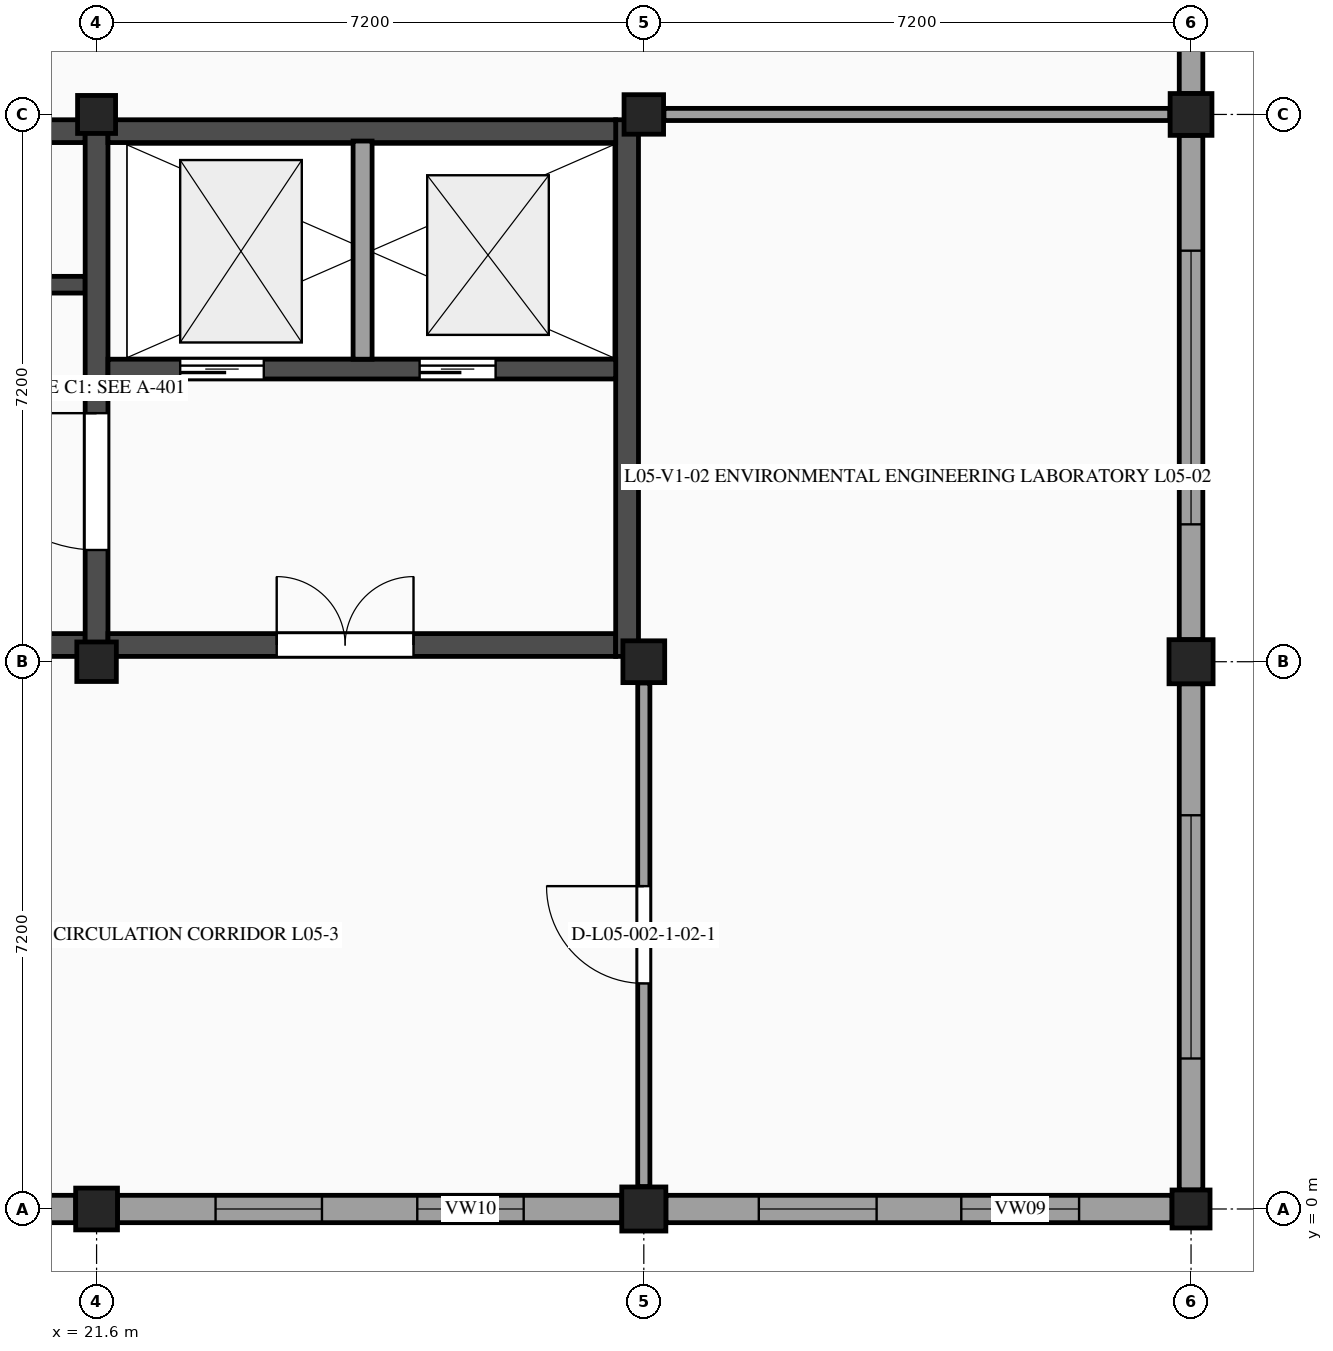
"""IFC4 building model, lengths in metres.
Left out: names, types, materials, properties, quantities, classifications, styles, units other than length and angle.
Written with IfcOpenShell. Run it as: python <this file> out.ifc"""

import sys

from ifc_helpers import new_model, si_unit, direction, frame, frame_2d, origin, origin_2d, place, context, subcontext, project, spatial, rectangle, extrude, element, fill, save


model = new_model("IFC4")
c1 = context("Model", 3, precision=1e-05, world=origin(), true_north=direction((0.0, 1.0)))
c2 = subcontext(c1, "Body", "Model", "MODEL_VIEW")
j1 = project(units=[si_unit("LENGTHUNIT", "METRE"), si_unit("PLANEANGLEUNIT", "RADIAN")], contexts=[c1])
p1 = place(None, origin())
s1 = spatial("IfcSite", under=j1, at=p1, CompositionType="ELEMENT")
p2 = place(p1, origin())
s2 = spatial("IfcBuilding", under=s1, at=p2, CompositionType="ELEMENT")
p3 = place(p2, frame((0.0, 0.0, 22.8)))
s3 = spatial("IfcBuildingStorey", under=s2, at=p3, CompositionType="ELEMENT", Elevation=22.8)
p4 = place(p3, frame((21.6, 0.0, 0.0), z_axis=(0.0, 0.0, 1.0), x_axis=(1.0, 0.0, 0.0)))
e1 = element("IfcColumn", 1, at=p4, inside=s3, PredefinedType="COLUMN", context=c2, shape_type="SweptSolid", body=[
    extrude(rectangle(XDim=0.55, YDim=0.55, at=origin_2d()), origin(), (0.0, 0.0, 1.0), 3.9),
])
p5 = place(p3, frame((21.6, 7.2, 0.0), z_axis=(0.0, 0.0, 1.0), x_axis=(1.0, 0.0, 0.0)))
e2 = element("IfcColumn", 2, at=p5, inside=s3, PredefinedType="COLUMN", context=c2, shape_type="SweptSolid", body=[
    extrude(rectangle(XDim=0.52, YDim=0.52, at=origin_2d()), origin(), (0.0, 0.0, 1.0), 3.9),
])
p6 = place(p3, frame((21.6, 14.4, 0.0), z_axis=(0.0, 0.0, 1.0), x_axis=(1.0, 0.0, 0.0)))
e3 = element("IfcColumn", 3, at=p6, inside=s3, PredefinedType="COLUMN", context=c2, shape_type="SweptSolid", body=[
    extrude(rectangle(XDim=0.5, YDim=0.5, at=origin_2d()), origin(), (0.0, 0.0, 1.0), 3.9),
])
p7 = place(p3, frame((28.8, 0.0, 0.0), z_axis=(0.0, 0.0, 1.0), x_axis=(1.0, 0.0, 0.0)))
e4 = element("IfcColumn", 4, at=p7, inside=s3, PredefinedType="COLUMN", context=c2, shape_type="SweptSolid", body=[
    extrude(rectangle(XDim=0.58, YDim=0.58, at=origin_2d()), origin(), (0.0, 0.0, 1.0), 3.9),
])
p8 = place(p3, frame((28.8, 7.2, 0.0), z_axis=(0.0, 0.0, 1.0), x_axis=(1.0, 0.0, 0.0)))
e5 = element("IfcColumn", 5, at=p8, inside=s3, PredefinedType="COLUMN", context=c2, shape_type="SweptSolid", body=[
    extrude(rectangle(XDim=0.55, YDim=0.55, at=origin_2d()), origin(), (0.0, 0.0, 1.0), 3.9),
])
p9 = place(p3, frame((28.8, 14.4, 0.0), z_axis=(0.0, 0.0, 1.0), x_axis=(1.0, 0.0, 0.0)))
e6 = element("IfcColumn", 6, at=p9, inside=s3, PredefinedType="COLUMN", context=c2, shape_type="SweptSolid", body=[
    extrude(rectangle(XDim=0.52, YDim=0.52, at=origin_2d()), origin(), (0.0, 0.0, 1.0), 3.9),
])
p10 = place(p3, frame((36.0, 0.0, 0.0), z_axis=(0.0, 0.0, 1.0), x_axis=(1.0, 0.0, 0.0)))
e7 = element("IfcColumn", 7, at=p10, inside=s3, PredefinedType="COLUMN", context=c2, shape_type="SweptSolid", body=[
    extrude(rectangle(XDim=0.5, YDim=0.5, at=origin_2d()), origin(), (0.0, 0.0, 1.0), 3.9),
])
p11 = place(p3, frame((36.0, 7.2, 0.0), z_axis=(0.0, 0.0, 1.0), x_axis=(1.0, 0.0, 0.0)))
e8 = element("IfcColumn", 8, at=p11, inside=s3, PredefinedType="COLUMN", context=c2, shape_type="SweptSolid", body=[
    extrude(rectangle(XDim=0.58, YDim=0.58, at=origin_2d()), origin(), (0.0, 0.0, 1.0), 3.9),
])
p12 = place(p3, frame((36.0, 14.4, 0.0), z_axis=(0.0, 0.0, 1.0), x_axis=(1.0, 0.0, 0.0)))
e9 = element("IfcColumn", 9, at=p12, inside=s3, PredefinedType="COLUMN", context=c2, shape_type="SweptSolid", body=[
    extrude(rectangle(XDim=0.55, YDim=0.55, at=origin_2d()), origin(), (0.0, 0.0, 1.0), 3.9),
])
p13 = place(p3, frame((36.0, 21.34, 0.0), z_axis=(0.0, 0.0, 1.0), x_axis=(0.0, -1.0, 0.0)))
e10 = element("IfcWall", 10, at=p13, inside=s3, PredefinedType="STANDARD", context=c2, shape_type="SweptSolid", body=[
    extrude(rectangle(XDim=6.665, YDim=0.31, at=frame_2d((3.333, 0.0))), origin(), (0.0, 0.0, 1.0), 2.865),
])
p14 = place(p13, frame((1.232, 0.0, 0.98)))
e11 = element("IfcOpeningElement", 11, at=p14, cuts=e10, PredefinedType="OPENING", context=c2, shape_type="SweptSolid", body=[
    extrude(rectangle(XDim=4.2, YDim=1.5, at=frame_2d((2.1, 0.75))), frame((0.0, 0.165, 0.0), z_axis=(0.0, -1.0, 0.0), x_axis=(1.0, 0.0, 0.0)), (0.0, 0.0, 1.0), 0.33),
])
p15 = place(p3, frame((36.0, 14.125, 0.0), z_axis=(0.0, 0.0, 1.0), x_axis=(0.0, -1.0, 0.0)))
e12 = element("IfcWall", 12, at=p15, inside=s3, PredefinedType="STANDARD", context=c2, shape_type="SweptSolid", body=[
    extrude(rectangle(XDim=6.635, YDim=0.31, at=frame_2d((3.317, 0.0))), origin(), (0.0, 0.0, 1.0), 2.865),
])
p16 = place(p15, frame((1.518, 0.0, 0.98)))
e13 = element("IfcOpeningElement", 13, at=p16, cuts=e12, PredefinedType="OPENING", context=c2, shape_type="SweptSolid", body=[
    extrude(rectangle(XDim=3.6, YDim=1.5, at=frame_2d((1.8, 0.75))), frame((0.0, 0.165, 0.0), z_axis=(0.0, -1.0, 0.0), x_axis=(1.0, 0.0, 0.0)), (0.0, 0.0, 1.0), 0.33),
])
p17 = place(p3, frame((36.0, 6.91, 0.0), z_axis=(0.0, 0.0, 1.0), x_axis=(0.0, -1.0, 0.0)))
e14 = element("IfcWall", 14, at=p17, inside=s3, PredefinedType="STANDARD", context=c2, shape_type="SweptSolid", body=[
    extrude(rectangle(XDim=6.66, YDim=0.31, at=frame_2d((3.33, 0.0))), origin(), (0.0, 0.0, 1.0), 2.865),
])
p18 = place(p17, frame((1.73, 0.0, 0.98)))
e15 = element("IfcOpeningElement", 15, at=p18, cuts=e14, PredefinedType="OPENING", context=c2, shape_type="SweptSolid", body=[
    extrude(rectangle(XDim=3.2, YDim=1.45, at=frame_2d((1.6, 0.725))), frame((0.0, 0.165, 0.0), z_axis=(0.0, -1.0, 0.0), x_axis=(1.0, 0.0, 0.0)), (0.0, 0.0, 1.0), 0.33),
])
p19 = place(p3, frame((35.75, 0.0, 0.0), z_axis=(0.0, 0.0, 1.0), x_axis=(-1.0, 0.0, 0.0)))
e16 = element("IfcWall", 16, at=p19, inside=s3, PredefinedType="STANDARD", context=c2, shape_type="SweptSolid", body=[
    extrude(rectangle(XDim=6.66, YDim=0.36, at=frame_2d((3.33, 0.0))), origin(), (0.0, 0.0, 1.0), 2.865),
])
p20 = place(p19, frame((1.223, 0.0, 1.15)))
e17 = element("IfcOpeningElement", 17, at=p20, cuts=e16, PredefinedType="OPENING", context=c2, shape_type="SweptSolid", body=[
    extrude(rectangle(XDim=1.55, YDim=1.35, at=frame_2d((0.775, 0.675))), frame((0.0, 0.19, 0.0), z_axis=(0.0, -1.0, 0.0), x_axis=(1.0, 0.0, 0.0)), (0.0, 0.0, 1.0), 0.38),
])
p21 = place(p19, frame((3.887, 0.0, 1.15)))
e18 = element("IfcOpeningElement", 18, at=p21, cuts=e16, PredefinedType="OPENING", context=c2, shape_type="SweptSolid", body=[
    extrude(rectangle(XDim=1.55, YDim=1.35, at=frame_2d((0.775, 0.675))), frame((0.0, 0.19, 0.0), z_axis=(0.0, -1.0, 0.0), x_axis=(1.0, 0.0, 0.0)), (0.0, 0.0, 1.0), 0.38),
])
p22 = place(p3, frame((28.51, 0.0, 0.0), z_axis=(0.0, 0.0, 1.0), x_axis=(-1.0, 0.0, 0.0)))
e19 = element("IfcWall", 19, at=p22, inside=s3, PredefinedType="STANDARD", context=c2, shape_type="SweptSolid", body=[
    extrude(rectangle(XDim=6.635, YDim=0.36, at=frame_2d((3.317, 0.0))), origin(), (0.0, 0.0, 1.0), 2.865),
])
p23 = place(p22, frame((1.291, 0.0, 1.15)))
e20 = element("IfcOpeningElement", 20, at=p23, cuts=e19, PredefinedType="OPENING", context=c2, shape_type="SweptSolid", body=[
    extrude(rectangle(XDim=1.4, YDim=1.3, at=frame_2d((0.7, 0.65))), frame((0.0, 0.19, 0.0), z_axis=(0.0, -1.0, 0.0), x_axis=(1.0, 0.0, 0.0)), (0.0, 0.0, 1.0), 0.38),
])
p24 = place(p22, frame((3.945, 0.0, 1.15)))
e21 = element("IfcOpeningElement", 21, at=p24, cuts=e19, PredefinedType="OPENING", context=c2, shape_type="SweptSolid", body=[
    extrude(rectangle(XDim=1.4, YDim=1.3, at=frame_2d((0.7, 0.65))), frame((0.0, 0.19, 0.0), z_axis=(0.0, -1.0, 0.0), x_axis=(1.0, 0.0, 0.0)), (0.0, 0.0, 1.0), 0.38),
])
p25 = place(p3, frame((21.325, 0.0, 0.0), z_axis=(0.0, 0.0, 1.0), x_axis=(-1.0, 0.0, 0.0)))
e22 = element("IfcWall", 22, at=p25, inside=s3, PredefinedType="STANDARD", context=c2, shape_type="SweptSolid", body=[
    extrude(rectangle(XDim=6.665, YDim=0.36, at=frame_2d((3.333, 0.0))), origin(), (0.0, 0.0, 1.0), 2.865),
])
p26 = place(p25, frame((1.375, 0.0, 1.15)))
e23 = element("IfcOpeningElement", 23, at=p26, cuts=e22, PredefinedType="OPENING", context=c2, shape_type="SweptSolid", body=[
    extrude(rectangle(XDim=1.25, YDim=1.25, at=frame_2d((0.625, 0.625))), frame((0.0, 0.19, 0.0), z_axis=(0.0, -1.0, 0.0), x_axis=(1.0, 0.0, 0.0)), (0.0, 0.0, 1.0), 0.38),
])
p27 = place(p25, frame((4.041, 0.0, 1.15)))
e24 = element("IfcOpeningElement", 24, at=p27, cuts=e22, PredefinedType="OPENING", context=c2, shape_type="SweptSolid", body=[
    extrude(rectangle(XDim=1.25, YDim=1.25, at=frame_2d((0.625, 0.625))), frame((0.0, 0.19, 0.0), z_axis=(0.0, -1.0, 0.0), x_axis=(1.0, 0.0, 0.0)), (0.0, 0.0, 1.0), 0.38),
])
p28 = place(p3, frame((14.77, 7.42, 0.0), z_axis=(0.0, 0.0, 1.0), x_axis=(1.0, 0.0, 0.0)))
e25 = element("IfcWall", 25, at=p28, inside=s3, PredefinedType="SHEAR", context=c2, shape_type="SweptSolid", body=[
    extrude(rectangle(XDim=6.68, YDim=0.3, at=frame_2d((3.34, 0.0))), origin(), (0.0, 0.0, 1.0), 3.67),
])
p29 = place(p3, frame((14.77, 14.18, 0.0), z_axis=(0.0, 0.0, 1.0), x_axis=(1.0, 0.0, 0.0)))
e26 = element("IfcWall", 26, at=p29, inside=s3, PredefinedType="SHEAR", context=c2, shape_type="SweptSolid", body=[
    extrude(rectangle(XDim=6.68, YDim=0.3, at=frame_2d((3.34, 0.0))), origin(), (0.0, 0.0, 1.0), 3.67),
])
p30 = place(p29, frame((1.42, 0.0, 0.0)))
e27 = element("IfcOpeningElement", 27, at=p30, cuts=e26, PredefinedType="OPENING", context=c2, shape_type="SweptSolid", body=[
    extrude(rectangle(XDim=0.85, YDim=2.1, at=frame_2d((0.425, 1.05))), frame((0.0, 0.16, 0.0), z_axis=(0.0, -1.0, 0.0), x_axis=(1.0, 0.0, 0.0)), (0.0, 0.0, 1.0), 0.32),
])
p31 = place(p29, frame((3.4, 0.0, 0.0)))
e28 = element("IfcOpeningElement", 28, at=p31, cuts=e26, PredefinedType="OPENING", context=c2, shape_type="SweptSolid", body=[
    extrude(rectangle(XDim=0.95, YDim=2.15, at=frame_2d((0.475, 1.075))), frame((0.0, 0.16, 0.0), z_axis=(0.0, -1.0, 0.0), x_axis=(1.0, 0.0, 0.0)), (0.0, 0.0, 1.0), 0.32),
])
p32 = place(p3, frame((14.77, 12.16, 0.0), z_axis=(0.0, 0.0, 1.0), x_axis=(1.0, 0.0, 0.0)))
e29 = element("IfcWall", 29, at=p32, inside=s3, PredefinedType="SHEAR", context=c2, shape_type="SweptSolid", body=[
    extrude(rectangle(XDim=6.68, YDim=0.22, at=frame_2d((3.34, 0.0))), origin(), (0.0, 0.0, 1.0), 3.67),
])
p33 = place(p3, frame((21.6, 7.27, 0.0), z_axis=(0.0, 0.0, 1.0), x_axis=(0.0, 1.0, 0.0)))
e30 = element("IfcWall", 30, at=p33, inside=s3, PredefinedType="SHEAR", context=c2, shape_type="SweptSolid", body=[
    extrude(rectangle(XDim=7.06, YDim=0.3, at=frame_2d((3.53, 0.0))), origin(), (0.0, 0.0, 1.0), 3.67),
])
p34 = place(p33, frame((1.4, 0.0, 0.0)))
e31 = element("IfcOpeningElement", 31, at=p34, cuts=e30, PredefinedType="OPENING", context=c2, shape_type="SweptSolid", body=[
    extrude(rectangle(XDim=1.8, YDim=2.2, at=frame_2d((0.9, 1.1))), frame((0.0, 0.16, 0.0), z_axis=(0.0, -1.0, 0.0), x_axis=(1.0, 0.0, 0.0)), (0.0, 0.0, 1.0), 0.32),
])
p35 = place(p3, frame((21.75, 7.42, 0.0), z_axis=(0.0, 0.0, 1.0), x_axis=(1.0, 0.0, 0.0)))
e32 = element("IfcWall", 32, at=p35, inside=s3, PredefinedType="SHEAR", context=c2, shape_type="SweptSolid", body=[
    extrude(rectangle(XDim=6.68, YDim=0.3, at=frame_2d((3.34, 0.0))), origin(), (0.0, 0.0, 1.0), 3.67),
])
p36 = place(p35, frame((2.22, 0.0, 0.0)))
e33 = element("IfcOpeningElement", 33, at=p36, cuts=e32, PredefinedType="OPENING", context=c2, shape_type="SweptSolid", body=[
    extrude(rectangle(XDim=1.8, YDim=2.2, at=frame_2d((0.9, 1.1))), frame((0.0, 0.16, 0.0), z_axis=(0.0, -1.0, 0.0), x_axis=(1.0, 0.0, 0.0)), (0.0, 0.0, 1.0), 0.32),
])
p37 = place(p3, frame((28.58, 7.27, 0.0), z_axis=(0.0, 0.0, 1.0), x_axis=(0.0, 1.0, 0.0)))
e34 = element("IfcWall", 34, at=p37, inside=s3, PredefinedType="SHEAR", context=c2, shape_type="SweptSolid", body=[
    extrude(rectangle(XDim=7.06, YDim=0.3, at=frame_2d((3.53, 0.0))), origin(), (0.0, 0.0, 1.0), 3.67),
])
p38 = place(p3, frame((21.75, 14.18, 0.0), z_axis=(0.0, 0.0, 1.0), x_axis=(1.0, 0.0, 0.0)))
e35 = element("IfcWall", 35, at=p38, inside=s3, PredefinedType="SHEAR", context=c2, shape_type="SweptSolid", body=[
    extrude(rectangle(XDim=6.68, YDim=0.3, at=frame_2d((3.34, 0.0))), origin(), (0.0, 0.0, 1.0), 3.67),
])
p39 = place(p3, frame((21.75, 11.05, 0.0), z_axis=(0.0, 0.0, 1.0), x_axis=(1.0, 0.0, 0.0)))
e36 = element("IfcWall", 36, at=p39, inside=s3, PredefinedType="SHEAR", context=c2, shape_type="SweptSolid", body=[
    extrude(rectangle(XDim=6.68, YDim=0.26, at=frame_2d((3.34, 0.0))), origin(), (0.0, 0.0, 1.0), 3.67),
])
p40 = place(p39, frame((0.95, 0.0, 0.0)))
e37 = element("IfcOpeningElement", 37, at=p40, cuts=e36, PredefinedType="OPENING", context=c2, shape_type="SweptSolid", body=[
    extrude(rectangle(XDim=1.1, YDim=2.2, at=frame_2d((0.55, 1.1))), frame((0.0, 0.14, 0.0), z_axis=(0.0, -1.0, 0.0), x_axis=(1.0, 0.0, 0.0)), (0.0, 0.0, 1.0), 0.28),
])
p41 = place(p39, frame((4.1, 0.0, 0.0)))
e38 = element("IfcOpeningElement", 38, at=p41, cuts=e36, PredefinedType="OPENING", context=c2, shape_type="SweptSolid", body=[
    extrude(rectangle(XDim=1.0, YDim=2.15, at=frame_2d((0.5, 1.075))), frame((0.0, 0.14, 0.0), z_axis=(0.0, -1.0, 0.0), x_axis=(1.0, 0.0, 0.0)), (0.0, 0.0, 1.0), 0.28),
])
p42 = place(p3, frame((25.1, 11.18, 0.0), z_axis=(0.0, 0.0, 1.0), x_axis=(0.0, 1.0, 0.0)))
e39 = element("IfcWall", 39, at=p42, inside=s3, PredefinedType="PARTITIONING", context=c2, shape_type="SweptSolid", body=[
    extrude(rectangle(XDim=2.87, YDim=0.25, at=frame_2d((1.435, 0.0))), origin(), (0.0, 0.0, 1.0), 3.67),
])
p43 = place(p3, frame((28.8, 0.295, 0.0), z_axis=(0.0, 0.0, 1.0), x_axis=(0.0, 1.0, 0.0)))
e40 = element("IfcWall", 40, at=p43, inside=s3, PredefinedType="PARTITIONING", context=c2, shape_type="SweptSolid", body=[
    extrude(rectangle(XDim=6.625, YDim=0.16, at=frame_2d((3.312, 0.0))), origin(), (0.0, 0.0, 1.0), 2.975),
])
p44 = place(p43, frame((2.673, 0.0, 0.0)))
e41 = element("IfcOpeningElement", 41, at=p44, cuts=e40, PredefinedType="OPENING", context=c2, shape_type="SweptSolid", body=[
    extrude(rectangle(XDim=1.28, YDim=2.24, at=frame_2d((0.64, 1.12))), frame((0.0, 0.09, 0.0), z_axis=(0.0, -1.0, 0.0), x_axis=(1.0, 0.0, 0.0)), (0.0, 0.0, 1.0), 0.18),
])
p45 = place(p3, frame((29.065, 14.4, 0.0), z_axis=(0.0, 0.0, 1.0), x_axis=(1.0, 0.0, 0.0)))
e42 = element("IfcWall", 42, at=p45, inside=s3, PredefinedType="PARTITIONING", context=c2, shape_type="SweptSolid", body=[
    extrude(rectangle(XDim=6.655, YDim=0.16, at=frame_2d((3.328, 0.0))), origin(), (0.0, 0.0, 1.0), 2.87),
])
p46 = place(p16, origin())
e43 = element("IfcWindow", 43, at=p46, inside=s3, PartitioningType="SINGLE_PANEL", PredefinedType="WINDOW", context=c2, shape_type="SweptSolid", body=[
    extrude(rectangle(XDim=3.6, YDim=1.5, at=frame_2d((1.8, 0.75))), frame((0.0, -0.03, 0.0), z_axis=(0.0, -1.0, 0.0), x_axis=(1.0, 0.0, 0.0)), (0.0, 0.0, 1.0), 0.06),
])
fill(e13, e43)
p47 = place(p18, origin())
e44 = element("IfcWindow", 44, at=p47, inside=s3, PartitioningType="SINGLE_PANEL", PredefinedType="WINDOW", context=c2, shape_type="SweptSolid", body=[
    extrude(rectangle(XDim=3.2, YDim=1.45, at=frame_2d((1.6, 0.725))), frame((0.0, -0.03, 0.0), z_axis=(0.0, -1.0, 0.0), x_axis=(1.0, 0.0, 0.0)), (0.0, 0.0, 1.0), 0.06),
])
fill(e15, e44)
p48 = place(p20, origin())
e45 = element("IfcWindow", 45, at=p48, inside=s3, PartitioningType="SINGLE_PANEL", PredefinedType="WINDOW", context=c2, shape_type="SweptSolid", body=[
    extrude(rectangle(XDim=1.55, YDim=1.35, at=frame_2d((0.775, 0.675))), frame((0.0, -0.08, 0.0), z_axis=(0.0, -1.0, 0.0), x_axis=(1.0, 0.0, 0.0)), (0.0, 0.0, 1.0), 0.06),
])
fill(e17, e45)
p49 = place(p21, origin())
e46 = element("IfcWindow", 46, at=p49, inside=s3, PartitioningType="SINGLE_PANEL", PredefinedType="WINDOW", context=c2, shape_type="SweptSolid", body=[
    extrude(rectangle(XDim=1.55, YDim=1.35, at=frame_2d((0.775, 0.675))), frame((0.0, -0.08, 0.0), z_axis=(0.0, -1.0, 0.0), x_axis=(1.0, 0.0, 0.0)), (0.0, 0.0, 1.0), 0.06),
])
fill(e18, e46)
p50 = place(p23, origin())
e47 = element("IfcWindow", 47, at=p50, inside=s3, PartitioningType="SINGLE_PANEL", PredefinedType="WINDOW", context=c2, shape_type="SweptSolid", body=[
    extrude(rectangle(XDim=1.4, YDim=1.3, at=frame_2d((0.7, 0.65))), frame((0.0, -0.08, 0.0), z_axis=(0.0, -1.0, 0.0), x_axis=(1.0, 0.0, 0.0)), (0.0, 0.0, 1.0), 0.06),
])
fill(e20, e47)
p51 = place(p24, origin())
e48 = element("IfcWindow", 48, at=p51, inside=s3, PartitioningType="SINGLE_PANEL", PredefinedType="WINDOW", context=c2, shape_type="SweptSolid", body=[
    extrude(rectangle(XDim=1.4, YDim=1.3, at=frame_2d((0.7, 0.65))), frame((0.0, -0.08, 0.0), z_axis=(0.0, -1.0, 0.0), x_axis=(1.0, 0.0, 0.0)), (0.0, 0.0, 1.0), 0.06),
])
fill(e21, e48)
p52 = place(p34, origin())
e49 = element("IfcDoor", 49, at=p52, inside=s3, OperationType="SINGLE_SWING_RIGHT", PredefinedType="DOOR", context=c2, shape_type="SweptSolid", body=[
    extrude(rectangle(XDim=1.8, YDim=2.2, at=frame_2d((0.9, 1.1))), frame((0.0, 0.025, 0.0), z_axis=(0.0, -1.0, 0.0), x_axis=(1.0, 0.0, 0.0)), (0.0, 0.0, 1.0), 0.05),
])
fill(e31, e49)
p53 = place(p40, origin())
e50 = element("IfcDoor", 50, at=p53, inside=s3, OperationType="SLIDING_TO_LEFT", PredefinedType="DOOR", context=c2, shape_type="SweptSolid", body=[
    extrude(rectangle(XDim=1.1, YDim=2.2, at=frame_2d((0.55, 1.1))), frame((0.0, 0.025, 0.0), z_axis=(0.0, -1.0, 0.0), x_axis=(1.0, 0.0, 0.0)), (0.0, 0.0, 1.0), 0.05),
])
fill(e37, e50)
p54 = place(p41, origin())
e51 = element("IfcDoor", 51, at=p54, inside=s3, OperationType="SLIDING_TO_RIGHT", PredefinedType="DOOR", context=c2, shape_type="SweptSolid", body=[
    extrude(rectangle(XDim=1.0, YDim=2.15, at=frame_2d((0.5, 1.075))), frame((0.0, 0.025, 0.0), z_axis=(0.0, -1.0, 0.0), x_axis=(1.0, 0.0, 0.0)), (0.0, 0.0, 1.0), 0.05),
])
fill(e38, e51)
p55 = place(p36, origin())
e52 = element("IfcDoor", 52, at=p55, inside=s3, OperationType="DOUBLE_DOOR_SINGLE_SWING", PredefinedType="DOOR", context=c2, shape_type="SweptSolid", body=[
    extrude(rectangle(XDim=1.8, YDim=2.2, at=frame_2d((0.9, 1.1))), frame((0.0, 0.025, 0.0), z_axis=(0.0, -1.0, 0.0), x_axis=(1.0, 0.0, 0.0)), (0.0, 0.0, 1.0), 0.05),
])
fill(e33, e52)
p56 = place(p44, origin())
e53 = element("IfcDoor", 53, at=p56, inside=s3, OperationType="SINGLE_SWING_RIGHT", PredefinedType="DOOR", context=c2, shape_type="SweptSolid", body=[
    extrude(rectangle(XDim=1.28, YDim=2.24, at=frame_2d((0.64, 1.12))), frame((0.0, 0.025, 0.0), z_axis=(0.0, -1.0, 0.0), x_axis=(1.0, 0.0, 0.0)), (0.0, 0.0, 1.0), 0.05),
])
fill(e41, e53)
save(model, sys.argv[1])
